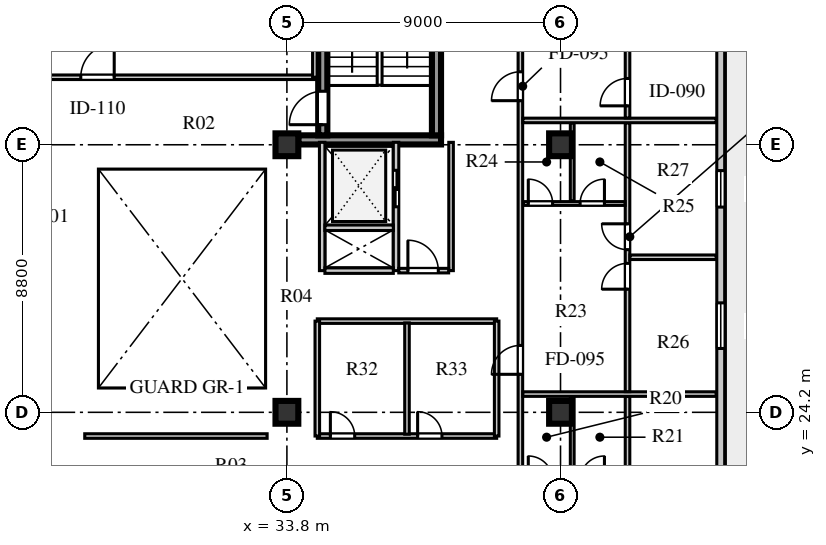
"""IFC4 building model, lengths in metres.
Left out: names, types, materials, properties, quantities, classifications, styles, units other than length and angle.
Written with IfcOpenShell. Run it as: python <this file> out.ifc"""

import sys

from ifc_helpers import new_model, si_unit, direction, frame, frame_2d, origin, origin_2d, place, context, subcontext, project, spatial, rectangle, extrude, element, fill, save


model = new_model("IFC4")
c1 = context("Model", 3, precision=1e-05, world=origin(), true_north=direction((0.0, 1.0)))
c2 = subcontext(c1, "Body", "Model", "MODEL_VIEW")
j1 = project(units=[si_unit("LENGTHUNIT", "METRE"), si_unit("PLANEANGLEUNIT", "RADIAN")], contexts=[c1])
p1 = place(None, origin())
s1 = spatial("IfcSite", under=j1, at=p1, CompositionType="ELEMENT")
p2 = place(p1, origin())
s2 = spatial("IfcBuilding", under=s1, at=p2, CompositionType="ELEMENT")
p3 = place(p2, frame((0.0, 0.0, 320.1)))
s3 = spatial("IfcBuildingStorey", under=s2, at=p3, CompositionType="ELEMENT", Elevation=320.1)
p4 = place(p3, frame((34.175, 33.16, 0.0), z_axis=(0.0, 0.0, 1.0), x_axis=(1.0, 0.0, 0.0)))
e1 = element("IfcWall", 1, at=p4, inside=s3, PredefinedType="SHEAR", context=c2, shape_type="SweptSolid", body=[
    extrude(rectangle(XDim=4.695, YDim=0.3, at=frame_2d((2.348, 0.0))), origin(), (0.0, 0.0, 1.0), 3.56),
])
p5 = place(p3, frame((34.98, 33.31, 0.0), z_axis=(0.0, 0.0, 1.0), x_axis=(0.0, 1.0, 0.0)))
e2 = element("IfcWall", 2, at=p5, inside=s3, PredefinedType="SHEAR", context=c2, shape_type="SweptSolid", body=[
    extrude(rectangle(XDim=8.03, YDim=0.3, at=frame_2d((4.015, 0.0))), origin(), (0.0, 0.0, 1.0), 3.56),
])
p6 = place(p5, frame((0.35, 0.0, 0.0)))
e3 = element("IfcOpeningElement", 3, at=p6, cuts=e2, PredefinedType="OPENING", context=c2, shape_type="SweptSolid", body=[
    extrude(rectangle(XDim=1.1, YDim=2.1, at=frame_2d((0.55, 1.05))), frame((0.0, 0.16, 0.0), z_axis=(0.0, -1.0, 0.0), x_axis=(1.0, 0.0, 0.0)), (0.0, 0.0, 1.0), 0.32),
])
p7 = place(p3, frame((38.72, 33.31, 0.0), z_axis=(0.0, 0.0, 1.0), x_axis=(0.0, 1.0, 0.0)))
e4 = element("IfcWall", 4, at=p7, inside=s3, PredefinedType="SHEAR", context=c2, shape_type="SweptSolid", body=[
    extrude(rectangle(XDim=8.03, YDim=0.3, at=frame_2d((4.015, 0.0))), origin(), (0.0, 0.0, 1.0), 3.56),
])
for number, where, z_axis, x_axis in (
    (5, (33.8, 24.2, 0.0), (0.0, 0.0, 1.0), (1.0, 0.0, 0.0)),
    (6, (33.8, 33.0, 0.0), (0.0, 0.0, 1.0), (1.0, 0.0, 0.0)),
    (7, (42.8, 24.2, 0.0), (0.0, 0.0, 1.0), (1.0, 0.0, 0.0)),
    (8, (42.8, 33.0, 0.0), (0.0, 0.0, 1.0), (1.0, 0.0, 0.0)),
):
    element("IfcColumn", number, at=place(p3, frame(where, z_axis=z_axis, x_axis=x_axis)), inside=s3, PredefinedType="COLUMN", context=c2, shape_type="SweptSolid", body=[
        extrude(rectangle(XDim=0.75, YDim=0.75, at=origin_2d()), origin(), (0.0, 0.0, 1.0), 3.56),
    ])
p8 = place(p3, frame((48.07, 13.41, 0.0), z_axis=(0.0, 0.0, 1.0), x_axis=(0.0, 1.0, 0.0)))
e9 = element("IfcWall", 9, at=p8, inside=s3, PredefinedType="SOLIDWALL", context=c2, shape_type="SweptSolid", body=[
    extrude(rectangle(XDim=30.38, YDim=0.26, at=frame_2d((15.19, 0.0))), origin(), (0.0, 0.0, 1.0), 3.56),
])
p9 = place(p8, frame((2.43, 0.0, 0.0)))
e10 = element("IfcOpeningElement", 10, at=p9, cuts=e9, PredefinedType="OPENING", context=c2, shape_type="SweptSolid", body=[
    extrude(rectangle(XDim=1.0, YDim=2.05, at=frame_2d((0.5, 1.025))), frame((0.0, 0.14, 0.0), z_axis=(0.0, -1.0, 0.0), x_axis=(1.0, 0.0, 0.0)), (0.0, 0.0, 1.0), 0.28),
])
p10 = place(p8, frame((6.54, 0.0, 0.8)))
e11 = element("IfcOpeningElement", 11, at=p10, cuts=e9, PredefinedType="OPENING", context=c2, shape_type="SweptSolid", body=[
    extrude(rectangle(XDim=1.8, YDim=2.0, at=frame_2d((0.9, 1.0))), frame((0.0, 0.14, 0.0), z_axis=(0.0, -1.0, 0.0), x_axis=(1.0, 0.0, 0.0)), (0.0, 0.0, 1.0), 0.28),
])
p11 = place(p8, frame((12.89, 0.0, 0.8)))
e12 = element("IfcOpeningElement", 12, at=p11, cuts=e9, PredefinedType="OPENING", context=c2, shape_type="SweptSolid", body=[
    extrude(rectangle(XDim=1.5, YDim=2.0, at=frame_2d((0.75, 1.0))), frame((0.0, 0.14, 0.0), z_axis=(0.0, -1.0, 0.0), x_axis=(1.0, 0.0, 0.0)), (0.0, 0.0, 1.0), 0.28),
])
p12 = place(p8, frame((17.54, 0.0, 0.8)))
e13 = element("IfcOpeningElement", 13, at=p12, cuts=e9, PredefinedType="OPENING", context=c2, shape_type="SweptSolid", body=[
    extrude(rectangle(XDim=1.2, YDim=1.75, at=frame_2d((0.6, 0.875))), frame((0.0, 0.14, 0.0), z_axis=(0.0, -1.0, 0.0), x_axis=(1.0, 0.0, 0.0)), (0.0, 0.0, 1.0), 0.28),
])
p13 = place(p8, frame((23.215, 0.0, 0.8)))
e14 = element("IfcOpeningElement", 14, at=p13, cuts=e9, PredefinedType="OPENING", context=c2, shape_type="SweptSolid", body=[
    extrude(rectangle(XDim=2.4, YDim=2.05, at=frame_2d((1.2, 1.025))), frame((0.0, 0.14, 0.0), z_axis=(0.0, -1.0, 0.0), x_axis=(1.0, 0.0, 0.0)), (0.0, 0.0, 1.0), 0.28),
])
p14 = place(p3, frame((34.96, 28.86, 0.0), z_axis=(0.0, 0.0, 1.0), x_axis=(0.0, 1.0, 0.0)))
e15 = element("IfcWall", 15, at=p14, inside=s3, PredefinedType="SOLIDWALL", context=c2, shape_type="SweptSolid", body=[
    extrude(rectangle(XDim=4.22, YDim=0.18, at=frame_2d((2.11, 0.0))), origin(), (0.0, 0.0, 1.0), 3.56),
])
p15 = place(p3, frame((37.39, 28.86, 0.0), z_axis=(0.0, 0.0, 1.0), x_axis=(0.0, 1.0, 0.0)))
e16 = element("IfcWall", 16, at=p15, inside=s3, PredefinedType="SOLIDWALL", context=c2, shape_type="SweptSolid", body=[
    extrude(rectangle(XDim=4.22, YDim=0.18, at=frame_2d((2.11, 0.0))), origin(), (0.0, 0.0, 1.0), 3.56),
])
p16 = place(p15, frame((2.1, 0.0, 0.0)))
e17 = element("IfcOpeningElement", 17, at=p16, cuts=e16, PredefinedType="OPENING", context=c2, shape_type="SweptSolid", body=[
    extrude(rectangle(XDim=1.2, YDim=2.12, at=frame_2d((0.6, 1.06))), frame((0.0, 0.1, 0.0), z_axis=(0.0, -1.0, 0.0), x_axis=(1.0, 0.0, 0.0)), (0.0, 0.0, 1.0), 0.2),
])
for number, where, z_axis, x_axis in (
    (18, (35.05, 28.86, 0.0), (0.0, 0.0, 1.0), (1.0, 0.0, 0.0)),
    (19, (35.05, 30.27, 0.0), (0.0, 0.0, 1.0), (1.0, 0.0, 0.0)),
):
    element("IfcWall", number, at=place(p3, frame(where, z_axis=z_axis, x_axis=x_axis)), inside=s3, PredefinedType="SOLIDWALL", context=c2, shape_type="SweptSolid", body=[
        extrude(rectangle(XDim=2.25, YDim=0.18, at=frame_2d((1.125, 0.0))), origin(), (0.0, 0.0, 1.0), 3.56),
    ])
p17 = place(p3, frame((39.2, 28.86, 0.0), z_axis=(0.0, 0.0, 1.0), x_axis=(0.0, 1.0, 0.0)))
e20 = element("IfcWall", 20, at=p17, inside=s3, PredefinedType="PARTITIONING", context=c2, shape_type="SweptSolid", body=[
    extrude(rectangle(XDim=4.22, YDim=0.15, at=frame_2d((2.11, 0.0))), origin(), (0.0, 0.0, 1.0), 3.56),
])
p18 = place(p3, frame((37.48, 28.86, 0.0), z_axis=(0.0, 0.0, 1.0), x_axis=(1.0, 0.0, 0.0)))
e21 = element("IfcWall", 21, at=p18, inside=s3, PredefinedType="PARTITIONING", context=c2, shape_type="SweptSolid", body=[
    extrude(rectangle(XDim=1.64, YDim=0.15, at=frame_2d((0.82, 0.0))), origin(), (0.0, 0.0, 1.0), 3.56),
])
p19 = place(p18, frame((0.3, 0.0, 0.0)))
e22 = element("IfcOpeningElement", 22, at=p19, cuts=e21, PredefinedType="OPENING", context=c2, shape_type="SweptSolid", body=[
    extrude(rectangle(XDim=1.0, YDim=2.1, at=frame_2d((0.5, 1.05))), frame((0.0, 0.085, 0.0), z_axis=(0.0, -1.0, 0.0), x_axis=(1.0, 0.0, 0.0)), (0.0, 0.0, 1.0), 0.17),
])
p20 = place(p3, frame((27.15, 23.42, 0.0), z_axis=(0.0, 0.0, 1.0), x_axis=(1.0, 0.0, 0.0)))
e23 = element("IfcWall", 23, at=p20, inside=s3, PredefinedType="PARTITIONING", context=c2, shape_type="SweptSolid", body=[
    extrude(rectangle(XDim=6.0, YDim=0.15, at=frame_2d((3.0, 0.0))), origin(), (0.0, 0.0, 1.0), 3.56),
])
p21 = place(p3, frame((25.22, 35.22, 0.0), z_axis=(0.0, 0.0, 1.0), x_axis=(1.0, 0.0, 0.0)))
e24 = element("IfcWall", 24, at=p21, inside=s3, PredefinedType="PARTITIONING", context=c2, shape_type="SweptSolid", body=[
    extrude(rectangle(XDim=9.5, YDim=0.15, at=frame_2d((4.75, 0.0))), origin(), (0.0, 0.0, 1.0), 3.56),
])
p22 = place(p21, frame((1.8, 0.0, 0.0)))
e25 = element("IfcOpeningElement", 25, at=p22, cuts=e24, PredefinedType="OPENING", context=c2, shape_type="SweptSolid", body=[
    extrude(rectangle(XDim=1.1, YDim=2.08, at=frame_2d((0.55, 1.04))), frame((0.0, 0.085, 0.0), z_axis=(0.0, -1.0, 0.0), x_axis=(1.0, 0.0, 0.0)), (0.0, 0.0, 1.0), 0.17),
])
p23 = place(p3, frame((34.72, 35.22, 0.0), z_axis=(0.0, 0.0, 1.0), x_axis=(0.0, 1.0, 0.0)))
e26 = element("IfcWall", 26, at=p23, inside=s3, PredefinedType="PARTITIONING", context=c2, shape_type="SweptSolid", body=[
    extrude(rectangle(XDim=11.6, YDim=0.15, at=frame_2d((5.8, 0.0))), origin(), (0.0, 0.0, 1.0), 3.56),
])
p24 = place(p3, frame((41.48, 15.35, 0.0), z_axis=(0.0, 0.0, 1.0), x_axis=(0.0, 1.0, 0.0)))
e27 = element("IfcWall", 27, at=p24, inside=s3, PredefinedType="PARTITIONING", context=c2, shape_type="SweptSolid", body=[
    extrude(rectangle(XDim=26.5, YDim=0.15, at=frame_2d((13.25, 0.0))), origin(), (0.0, 0.0, 1.0), 3.56),
])
p25 = place(p24, frame((0.75, 0.0, 0.0)))
e28 = element("IfcOpeningElement", 28, at=p25, cuts=e27, PredefinedType="OPENING", context=c2, shape_type="SweptSolid", body=[
    extrude(rectangle(XDim=0.95, YDim=2.1, at=frame_2d((0.475, 1.05))), frame((0.0, 0.085, 0.0), z_axis=(0.0, -1.0, 0.0), x_axis=(1.0, 0.0, 0.0)), (0.0, 0.0, 1.0), 0.17),
])
p26 = place(p24, frame((10.1, 0.0, 0.0)))
e29 = element("IfcOpeningElement", 29, at=p26, cuts=e27, PredefinedType="OPENING", context=c2, shape_type="SweptSolid", body=[
    extrude(rectangle(XDim=0.95, YDim=2.1, at=frame_2d((0.475, 1.05))), frame((0.0, 0.085, 0.0), z_axis=(0.0, -1.0, 0.0), x_axis=(1.0, 0.0, 0.0)), (0.0, 0.0, 1.0), 0.17),
])
p27 = place(p24, frame((19.1, 0.0, 0.0)))
e30 = element("IfcOpeningElement", 30, at=p27, cuts=e27, PredefinedType="OPENING", context=c2, shape_type="SweptSolid", body=[
    extrude(rectangle(XDim=0.95, YDim=2.1, at=frame_2d((0.475, 1.05))), frame((0.0, 0.085, 0.0), z_axis=(0.0, -1.0, 0.0), x_axis=(1.0, 0.0, 0.0)), (0.0, 0.0, 1.0), 0.17),
])
p28 = place(p3, frame((45.004, 15.53, 0.0), z_axis=(0.0, 0.0, 1.0), x_axis=(0.0, 1.0, 0.0)))
e31 = element("IfcWall", 31, at=p28, inside=s3, PredefinedType="PARTITIONING", context=c2, shape_type="SweptSolid", body=[
    extrude(rectangle(XDim=9.19, YDim=0.15, at=frame_2d((4.595, 0.0))), origin(), (0.0, 0.0, 1.0), 3.56),
])
p29 = place(p28, frame((0.4, 0.0, 0.0)))
e32 = element("IfcOpeningElement", 32, at=p29, cuts=e31, PredefinedType="OPENING", context=c2, shape_type="SweptSolid", body=[
    extrude(rectangle(XDim=0.9, YDim=2.08, at=frame_2d((0.45, 1.04))), frame((0.0, 0.085, 0.0), z_axis=(0.0, -1.0, 0.0), x_axis=(1.0, 0.0, 0.0)), (0.0, 0.0, 1.0), 0.17),
])
p30 = place(p3, frame((43.185, 22.043, 0.0), z_axis=(0.0, 0.0, 1.0), x_axis=(0.0, 1.0, 0.0)))
e33 = element("IfcWall", 33, at=p30, inside=s3, PredefinedType="PLUMBINGWALL", context=c2, shape_type="SweptSolid", body=[
    extrude(rectangle(XDim=2.677, YDim=0.125, at=frame_2d((1.338, 0.0))), origin(), (0.0, 0.0, 1.0), 3.56),
])
p31 = place(p3, frame((41.56, 24.8, 0.0), z_axis=(0.0, 0.0, 1.0), x_axis=(1.0, 0.0, 0.0)))
e34 = element("IfcWall", 34, at=p31, inside=s3, PredefinedType="PARTITIONING", context=c2, shape_type="SweptSolid", body=[
    extrude(rectangle(XDim=6.36, YDim=0.15, at=frame_2d((3.18, 0.0))), origin(), (0.0, 0.0, 1.0), 3.56),
])
p32 = place(p3, frame((45.004, 24.88, 0.0), z_axis=(0.0, 0.0, 1.0), x_axis=(0.0, 1.0, 0.0)))
e35 = element("IfcWall", 35, at=p32, inside=s3, PredefinedType="PARTITIONING", context=c2, shape_type="SweptSolid", body=[
    extrude(rectangle(XDim=8.84, YDim=0.15, at=frame_2d((4.42, 0.0))), origin(), (0.0, 0.0, 1.0), 3.56),
])
p33 = place(p32, frame((3.37, 0.0, 0.0)))
e36 = element("IfcOpeningElement", 36, at=p33, cuts=e35, PredefinedType="OPENING", context=c2, shape_type="SweptSolid", body=[
    extrude(rectangle(XDim=0.85, YDim=2.08, at=frame_2d((0.425, 1.04))), frame((0.0, 0.085, 0.0), z_axis=(0.0, -1.0, 0.0), x_axis=(1.0, 0.0, 0.0)), (0.0, 0.0, 1.0), 0.17),
])
p34 = place(p32, frame((4.67, 0.0, 0.0)))
e37 = element("IfcOpeningElement", 37, at=p34, cuts=e35, PredefinedType="OPENING", context=c2, shape_type="SweptSolid", body=[
    extrude(rectangle(XDim=0.85, YDim=2.08, at=frame_2d((0.425, 1.04))), frame((0.0, 0.085, 0.0), z_axis=(0.0, -1.0, 0.0), x_axis=(1.0, 0.0, 0.0)), (0.0, 0.0, 1.0), 0.17),
])
p35 = place(p3, frame((41.58, 31.068, 0.0), z_axis=(0.0, 0.0, 1.0), x_axis=(1.0, 0.0, 0.0)))
e38 = element("IfcWall", 38, at=p35, inside=s3, PredefinedType="PLUMBINGWALL", context=c2, shape_type="SweptSolid", body=[
    extrude(rectangle(XDim=3.344, YDim=0.125, at=frame_2d((1.672, 0.0))), origin(), (0.0, 0.0, 1.0), 3.56),
])
p36 = place(p35, frame((0.16, 0.0, 0.0)))
e39 = element("IfcOpeningElement", 39, at=p36, cuts=e38, PredefinedType="OPENING", context=c2, shape_type="SweptSolid", body=[
    extrude(rectangle(XDim=0.8, YDim=2.05, at=frame_2d((0.4, 1.025))), frame((0.0, 0.073, 0.0), z_axis=(0.0, -1.0, 0.0), x_axis=(1.0, 0.0, 0.0)), (0.0, 0.0, 1.0), 0.145),
])
p37 = place(p35, frame((1.865, 0.0, 0.0)))
e40 = element("IfcOpeningElement", 40, at=p37, cuts=e38, PredefinedType="OPENING", context=c2, shape_type="SweptSolid", body=[
    extrude(rectangle(XDim=0.8, YDim=2.05, at=frame_2d((0.4, 1.025))), frame((0.0, 0.073, 0.0), z_axis=(0.0, -1.0, 0.0), x_axis=(1.0, 0.0, 0.0)), (0.0, 0.0, 1.0), 0.145),
])
p38 = place(p3, frame((43.185, 31.148, 0.0), z_axis=(0.0, 0.0, 1.0), x_axis=(0.0, 1.0, 0.0)))
e41 = element("IfcWall", 41, at=p38, inside=s3, PredefinedType="PLUMBINGWALL", context=c2, shape_type="SweptSolid", body=[
    extrude(rectangle(XDim=2.572, YDim=0.125, at=frame_2d((1.286, 0.0))), origin(), (0.0, 0.0, 1.0), 3.56),
])
p39 = place(p3, frame((45.084, 29.3, 0.0), z_axis=(0.0, 0.0, 1.0), x_axis=(1.0, 0.0, 0.0)))
e42 = element("IfcWall", 42, at=p39, inside=s3, PredefinedType="PARTITIONING", context=c2, shape_type="SweptSolid", body=[
    extrude(rectangle(XDim=2.836, YDim=0.15, at=frame_2d((1.418, 0.0))), origin(), (0.0, 0.0, 1.0), 3.56),
])
p40 = place(p3, frame((41.56, 33.8, 0.0), z_axis=(0.0, 0.0, 1.0), x_axis=(1.0, 0.0, 0.0)))
e43 = element("IfcWall", 43, at=p40, inside=s3, PredefinedType="PARTITIONING", context=c2, shape_type="SweptSolid", body=[
    extrude(rectangle(XDim=6.36, YDim=0.15, at=frame_2d((3.18, 0.0))), origin(), (0.0, 0.0, 1.0), 3.56),
])
p41 = place(p3, frame((45.004, 33.88, 0.0), z_axis=(0.0, 0.0, 1.0), x_axis=(0.0, 1.0, 0.0)))
e44 = element("IfcWall", 44, at=p41, inside=s3, PredefinedType="PARTITIONING", context=c2, shape_type="SweptSolid", body=[
    extrude(rectangle(XDim=7.79, YDim=0.15, at=frame_2d((3.895, 0.0))), origin(), (0.0, 0.0, 1.0), 3.56),
])
p42 = place(p41, frame((0.4, 0.0, 0.0)))
e45 = element("IfcOpeningElement", 45, at=p42, cuts=e44, PredefinedType="OPENING", context=c2, shape_type="SweptSolid", body=[
    extrude(rectangle(XDim=0.9, YDim=2.08, at=frame_2d((0.45, 1.04))), frame((0.0, 0.085, 0.0), z_axis=(0.0, -1.0, 0.0), x_axis=(1.0, 0.0, 0.0)), (0.0, 0.0, 1.0), 0.17),
])
p43 = place(p3, frame((34.8, 23.42, 0.0), z_axis=(0.0, 0.0, 1.0), x_axis=(1.0, 0.0, 0.0)))
e46 = element("IfcWall", 46, at=p43, inside=s3, PredefinedType="PARTITIONING", context=c2, shape_type="SweptSolid", body=[
    extrude(rectangle(XDim=5.9, YDim=0.15, at=frame_2d((2.95, 0.0))), origin(), (0.0, 0.0, 1.0), 3.56),
])
p44 = place(p43, frame((0.43, 0.0, 0.0)))
e47 = element("IfcOpeningElement", 47, at=p44, cuts=e46, PredefinedType="OPENING", context=c2, shape_type="SweptSolid", body=[
    extrude(rectangle(XDim=0.8, YDim=2.05, at=frame_2d((0.4, 1.025))), frame((0.0, 0.085, 0.0), z_axis=(0.0, -1.0, 0.0), x_axis=(1.0, 0.0, 0.0)), (0.0, 0.0, 1.0), 0.17),
])
p45 = place(p43, frame((3.3, 0.0, 0.0)))
e48 = element("IfcOpeningElement", 48, at=p45, cuts=e46, PredefinedType="OPENING", context=c2, shape_type="SweptSolid", body=[
    extrude(rectangle(XDim=0.8, YDim=2.05, at=frame_2d((0.4, 1.025))), frame((0.0, 0.085, 0.0), z_axis=(0.0, -1.0, 0.0), x_axis=(1.0, 0.0, 0.0)), (0.0, 0.0, 1.0), 0.17),
])
p46 = place(p3, frame((34.8, 27.2, 0.0), z_axis=(0.0, 0.0, 1.0), x_axis=(1.0, 0.0, 0.0)))
e49 = element("IfcWall", 49, at=p46, inside=s3, PredefinedType="PARTITIONING", context=c2, shape_type="SweptSolid", body=[
    extrude(rectangle(XDim=5.9, YDim=0.15, at=frame_2d((2.95, 0.0))), origin(), (0.0, 0.0, 1.0), 3.26),
])
for number, where, z_axis, x_axis in (
    (50, (34.8, 23.42, 0.0), (0.0, 0.0, 1.0), (0.0, 1.0, 0.0)),
    (51, (40.7, 23.42, 0.0), (0.0, 0.0, 1.0), (0.0, 1.0, 0.0)),
):
    element("IfcWall", number, at=place(p3, frame(where, z_axis=z_axis, x_axis=x_axis)), inside=s3, PredefinedType="PARTITIONING", context=c2, shape_type="SweptSolid", body=[
        extrude(rectangle(XDim=3.78, YDim=0.15, at=frame_2d((1.89, 0.0))), origin(), (0.0, 0.0, 1.0), 3.56),
    ])
p47 = place(p3, frame((37.75, 23.48, 0.0), z_axis=(0.0, 0.0, 1.0), x_axis=(0.0, 1.0, 0.0)))
e52 = element("IfcWall", 52, at=p47, inside=s3, PredefinedType="PARTITIONING", context=c2, shape_type="SweptSolid", body=[
    extrude(rectangle(XDim=3.66, YDim=0.15, at=frame_2d((1.83, 0.0))), origin(), (0.0, 0.0, 1.0), 3.56),
])
p48 = place(p11, origin())
e53 = element("IfcWindow", 53, at=p48, inside=s3, PartitioningType="SINGLE_PANEL", PredefinedType="WINDOW", context=c2, shape_type="SweptSolid", body=[
    extrude(rectangle(XDim=1.5, YDim=2.0, at=frame_2d((0.75, 1.0))), frame((0.0, 0.03, 0.0), z_axis=(0.0, -1.0, 0.0), x_axis=(1.0, 0.0, 0.0)), (0.0, 0.0, 1.0), 0.06),
])
fill(e12, e53)
p49 = place(p12, origin())
e54 = element("IfcWindow", 54, at=p49, inside=s3, PartitioningType="SINGLE_PANEL", PredefinedType="WINDOW", context=c2, shape_type="SweptSolid", body=[
    extrude(rectangle(XDim=1.2, YDim=1.75, at=frame_2d((0.6, 0.875))), frame((0.0, 0.03, 0.0), z_axis=(0.0, -1.0, 0.0), x_axis=(1.0, 0.0, 0.0)), (0.0, 0.0, 1.0), 0.06),
])
fill(e13, e54)
p50 = place(p6, origin())
e55 = element("IfcDoor", 55, at=p50, inside=s3, OperationType="SINGLE_SWING_LEFT", PredefinedType="DOOR", context=c2, shape_type="SweptSolid", body=[
    extrude(rectangle(XDim=1.1, YDim=2.1, at=frame_2d((0.55, 1.05))), frame((0.0, 0.025, 0.0), z_axis=(0.0, -1.0, 0.0), x_axis=(1.0, 0.0, 0.0)), (0.0, 0.0, 1.0), 0.05),
])
fill(e3, e55)
p51 = place(p16, frame((1.2, 0.0, 0.0), z_axis=(0.0, 0.0, 1.0), x_axis=(-1.0, 0.0, 0.0)))
e56 = element("IfcDoor", 56, at=p51, inside=s3, OperationType="DOUBLE_DOOR_SLIDING", PredefinedType="DOOR", context=c2, shape_type="SweptSolid", body=[
    extrude(rectangle(XDim=1.2, YDim=2.12, at=frame_2d((0.6, 1.06))), frame((0.0, 0.025, 0.0), z_axis=(0.0, -1.0, 0.0), x_axis=(1.0, 0.0, 0.0)), (0.0, 0.0, 1.0), 0.05),
])
fill(e17, e56)
p52 = place(p19, origin())
e57 = element("IfcDoor", 57, at=p52, inside=s3, OperationType="SINGLE_SWING_LEFT", PredefinedType="DOOR", context=c2, shape_type="SweptSolid", body=[
    extrude(rectangle(XDim=1.0, YDim=2.1, at=frame_2d((0.5, 1.05))), frame((0.0, 0.025, 0.0), z_axis=(0.0, -1.0, 0.0), x_axis=(1.0, 0.0, 0.0)), (0.0, 0.0, 1.0), 0.05),
])
fill(e22, e57)
p53 = place(p22, origin())
e58 = element("IfcDoor", 58, at=p53, inside=s3, OperationType="SINGLE_SWING_RIGHT", PredefinedType="DOOR", context=c2, shape_type="SweptSolid", body=[
    extrude(rectangle(XDim=1.1, YDim=2.08, at=frame_2d((0.55, 1.04))), frame((0.0, 0.025, 0.0), z_axis=(0.0, -1.0, 0.0), x_axis=(1.0, 0.0, 0.0)), (0.0, 0.0, 1.0), 0.05),
])
fill(e25, e58)
p54 = place(p36, origin())
e59 = element("IfcDoor", 59, at=p54, inside=s3, OperationType="SINGLE_SWING_LEFT", PredefinedType="DOOR", context=c2, shape_type="SweptSolid", body=[
    extrude(rectangle(XDim=0.8, YDim=2.05, at=frame_2d((0.4, 1.025))), frame((0.0, 0.025, 0.0), z_axis=(0.0, -1.0, 0.0), x_axis=(1.0, 0.0, 0.0)), (0.0, 0.0, 1.0), 0.05),
])
fill(e39, e59)
p55 = place(p37, origin())
e60 = element("IfcDoor", 60, at=p55, inside=s3, OperationType="SINGLE_SWING_RIGHT", PredefinedType="DOOR", context=c2, shape_type="SweptSolid", body=[
    extrude(rectangle(XDim=0.8, YDim=2.05, at=frame_2d((0.4, 1.025))), frame((0.0, 0.025, 0.0), z_axis=(0.0, -1.0, 0.0), x_axis=(1.0, 0.0, 0.0)), (0.0, 0.0, 1.0), 0.05),
])
fill(e40, e60)
p56 = place(p33, origin())
e61 = element("IfcDoor", 61, at=p56, inside=s3, OperationType="SINGLE_SWING_LEFT", PredefinedType="DOOR", context=c2, shape_type="SweptSolid", body=[
    extrude(rectangle(XDim=0.85, YDim=2.08, at=frame_2d((0.425, 1.04))), frame((0.0, 0.025, 0.0), z_axis=(0.0, -1.0, 0.0), x_axis=(1.0, 0.0, 0.0)), (0.0, 0.0, 1.0), 0.05),
])
fill(e36, e61)
p57 = place(p34, origin())
e62 = element("IfcDoor", 62, at=p57, inside=s3, OperationType="SINGLE_SWING_RIGHT", PredefinedType="DOOR", context=c2, shape_type="SweptSolid", body=[
    extrude(rectangle(XDim=0.85, YDim=2.08, at=frame_2d((0.425, 1.04))), frame((0.0, 0.025, 0.0), z_axis=(0.0, -1.0, 0.0), x_axis=(1.0, 0.0, 0.0)), (0.0, 0.0, 1.0), 0.05),
])
fill(e37, e62)
p58 = place(p26, origin())
e63 = element("IfcDoor", 63, at=p58, inside=s3, OperationType="SINGLE_SWING_LEFT", PredefinedType="DOOR", context=c2, shape_type="SweptSolid", body=[
    extrude(rectangle(XDim=0.95, YDim=2.1, at=frame_2d((0.475, 1.05))), frame((0.0, 0.025, 0.0), z_axis=(0.0, -1.0, 0.0), x_axis=(1.0, 0.0, 0.0)), (0.0, 0.0, 1.0), 0.05),
])
fill(e29, e63)
p59 = place(p42, origin())
e64 = element("IfcDoor", 64, at=p59, inside=s3, OperationType="SINGLE_SWING_LEFT", PredefinedType="DOOR", context=c2, shape_type="SweptSolid", body=[
    extrude(rectangle(XDim=0.9, YDim=2.08, at=frame_2d((0.45, 1.04))), frame((0.0, 0.025, 0.0), z_axis=(0.0, -1.0, 0.0), x_axis=(1.0, 0.0, 0.0)), (0.0, 0.0, 1.0), 0.05),
])
fill(e45, e64)
p60 = place(p27, origin())
e65 = element("IfcDoor", 65, at=p60, inside=s3, OperationType="SINGLE_SWING_LEFT", PredefinedType="DOOR", context=c2, shape_type="SweptSolid", body=[
    extrude(rectangle(XDim=0.95, YDim=2.1, at=frame_2d((0.475, 1.05))), frame((0.0, 0.025, 0.0), z_axis=(0.0, -1.0, 0.0), x_axis=(1.0, 0.0, 0.0)), (0.0, 0.0, 1.0), 0.05),
])
fill(e30, e65)
p61 = place(p44, origin())
e66 = element("IfcDoor", 66, at=p61, inside=s3, OperationType="SINGLE_SWING_LEFT", PredefinedType="DOOR", context=c2, shape_type="SweptSolid", body=[
    extrude(rectangle(XDim=0.8, YDim=2.05, at=frame_2d((0.4, 1.025))), frame((0.0, 0.025, 0.0), z_axis=(0.0, -1.0, 0.0), x_axis=(1.0, 0.0, 0.0)), (0.0, 0.0, 1.0), 0.05),
])
fill(e47, e66)
p62 = place(p45, origin())
e67 = element("IfcDoor", 67, at=p62, inside=s3, OperationType="SINGLE_SWING_LEFT", PredefinedType="DOOR", context=c2, shape_type="SweptSolid", body=[
    extrude(rectangle(XDim=0.8, YDim=2.05, at=frame_2d((0.4, 1.025))), frame((0.0, 0.025, 0.0), z_axis=(0.0, -1.0, 0.0), x_axis=(1.0, 0.0, 0.0)), (0.0, 0.0, 1.0), 0.05),
])
fill(e48, e67)
save(model, sys.argv[1])
